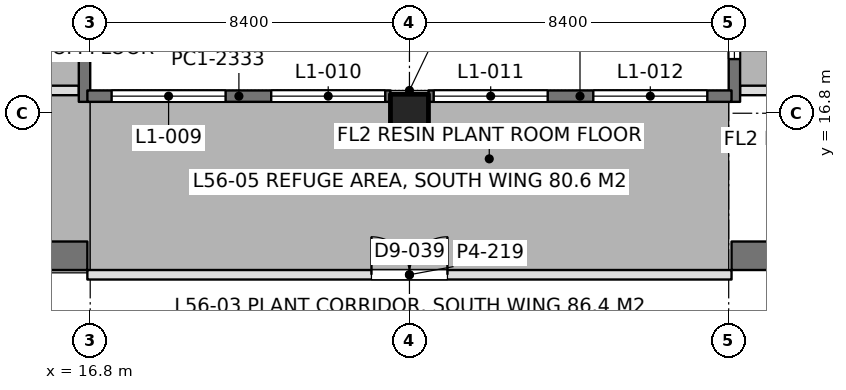
"""IFC4 building model, lengths in metres.
Left out: names, types, materials, properties, quantities, classifications, styles, units other than length and angle.
Written with IfcOpenShell. Run it as: python <this file> out.ifc"""

import sys

from ifc_helpers import new_model, si_unit, direction, frame, frame_2d, origin, origin_2d, place, context, subcontext, project, spatial, rectangle, extrude, element, fill, save


model = new_model("IFC4")
c1 = context("Model", 3, precision=1e-05, world=origin(), true_north=direction((0.0, 1.0)))
c2 = subcontext(c1, "Body", "Model", "MODEL_VIEW")
j1 = project(units=[si_unit("LENGTHUNIT", "METRE"), si_unit("PLANEANGLEUNIT", "RADIAN")], contexts=[c1])
p1 = place(None, origin())
s1 = spatial("IfcSite", under=j1, at=p1, CompositionType="ELEMENT")
p2 = place(p1, origin())
s2 = spatial("IfcBuilding", under=s1, at=p2, CompositionType="ELEMENT")
p3 = place(p2, frame((0.0, 0.0, 244.8)))
s3 = spatial("IfcBuildingStorey", under=s2, at=p3, CompositionType="ELEMENT", Elevation=244.8)
p4 = place(p3, frame((25.2, 16.8, 0.0), z_axis=(0.0, 0.0, 1.0), x_axis=(1.0, 0.0, 0.0)))
e1 = element("IfcColumn", 1, at=p4, inside=s3, PredefinedType="COLUMN", context=c2, shape_type="SweptSolid", body=[
    extrude(rectangle(XDim=1.0, YDim=1.0, at=origin_2d()), origin(), (0.0, 0.0, 1.0), 5.4),
])
p5 = place(p3, frame((-1.125, 13.05, 0.0), z_axis=(0.0, 0.0, 1.0), x_axis=(1.0, 0.0, 0.0)))
e2 = element("IfcWall", 2, at=p5, inside=s3, PredefinedType="SHEAR", context=c2, shape_type="SweptSolid", body=[
    extrude(rectangle(XDim=17.85, YDim=0.75, at=frame_2d((8.925, 0.0))), origin(), (0.0, 0.0, 1.0), 5.4),
])
p6 = place(p5, frame((8.875, 0.0, 0.0)))
e3 = element("IfcOpeningElement", 3, at=p6, cuts=e2, PredefinedType="OPENING", context=c2, shape_type="SweptSolid", body=[
    extrude(rectangle(XDim=1.8, YDim=2.4, at=frame_2d((0.9, 1.2))), frame((0.0, 0.385, 0.0), z_axis=(0.0, -1.0, 0.0), x_axis=(1.0, 0.0, 0.0)), (0.0, 0.0, 1.0), 0.77),
])
p7 = place(p3, frame((33.675, 13.05, 0.0), z_axis=(0.0, 0.0, 1.0), x_axis=(1.0, 0.0, 0.0)))
e4 = element("IfcWall", 4, at=p7, inside=s3, PredefinedType="SHEAR", context=c2, shape_type="SweptSolid", body=[
    extrude(rectangle(XDim=17.85, YDim=0.75, at=frame_2d((8.925, 0.0))), origin(), (0.0, 0.0, 1.0), 5.4),
])
p8 = place(p7, frame((7.175, 0.0, 0.0)))
e5 = element("IfcOpeningElement", 5, at=p8, cuts=e4, PredefinedType="OPENING", context=c2, shape_type="SweptSolid", body=[
    extrude(rectangle(XDim=1.8, YDim=2.4, at=frame_2d((0.9, 1.2))), frame((0.0, 0.385, 0.0), z_axis=(0.0, -1.0, 0.0), x_axis=(1.0, 0.0, 0.0)), (0.0, 0.0, 1.0), 0.77),
])
p9 = place(p3, frame((16.65, 17.1, 0.0), z_axis=(0.0, 0.0, 1.0), x_axis=(0.0, 1.0, 0.0)))
e6 = element("IfcWall", 6, at=p9, inside=s3, PredefinedType="SOLIDWALL", context=c2, shape_type="SweptSolid", body=[
    extrude(rectangle(XDim=10.7, YDim=0.3, at=frame_2d((5.35, 0.0))), origin(), (0.0, 0.0, 1.0), 5.25),
])
p10 = place(p9, frame((1.125, 0.0, 1.2)))
e7 = element("IfcOpeningElement", 7, at=p10, cuts=e6, PredefinedType="OPENING", context=c2, shape_type="SweptSolid", body=[
    extrude(rectangle(XDim=3.0, YDim=2.4, at=frame_2d((1.5, 1.2))), frame((0.0, 0.16, 0.0), z_axis=(0.0, -1.0, 0.0), x_axis=(1.0, 0.0, 0.0)), (0.0, 0.0, 1.0), 0.32),
])
p11 = place(p9, frame((7.175, 0.0, 1.2)))
e8 = element("IfcOpeningElement", 8, at=p11, cuts=e6, PredefinedType="OPENING", context=c2, shape_type="SweptSolid", body=[
    extrude(rectangle(XDim=3.0, YDim=2.4, at=frame_2d((1.5, 1.2))), frame((0.0, 0.16, 0.0), z_axis=(0.0, -1.0, 0.0), x_axis=(1.0, 0.0, 0.0)), (0.0, 0.0, 1.0), 0.32),
])
p12 = place(p3, frame((33.75, 17.1, 0.0), z_axis=(0.0, 0.0, 1.0), x_axis=(0.0, 1.0, 0.0)))
e9 = element("IfcWall", 9, at=p12, inside=s3, PredefinedType="SOLIDWALL", context=c2, shape_type="SweptSolid", body=[
    extrude(rectangle(XDim=10.7, YDim=0.3, at=frame_2d((5.35, 0.0))), origin(), (0.0, 0.0, 1.0), 5.25),
])
p13 = place(p12, frame((1.125, 0.0, 1.2)))
e10 = element("IfcOpeningElement", 10, at=p13, cuts=e9, PredefinedType="OPENING", context=c2, shape_type="SweptSolid", body=[
    extrude(rectangle(XDim=3.0, YDim=2.4, at=frame_2d((1.5, 1.2))), frame((0.0, 0.16, 0.0), z_axis=(0.0, -1.0, 0.0), x_axis=(1.0, 0.0, 0.0)), (0.0, 0.0, 1.0), 0.32),
])
p14 = place(p12, frame((7.175, 0.0, 1.2)))
e11 = element("IfcOpeningElement", 11, at=p14, cuts=e9, PredefinedType="OPENING", context=c2, shape_type="SweptSolid", body=[
    extrude(rectangle(XDim=3.0, YDim=2.4, at=frame_2d((1.5, 1.2))), frame((0.0, 0.16, 0.0), z_axis=(0.0, -1.0, 0.0), x_axis=(1.0, 0.0, 0.0)), (0.0, 0.0, 1.0), 0.32),
])
p15 = place(p3, frame((16.725, 17.25, 0.0), z_axis=(0.0, 0.0, 1.0), x_axis=(1.0, 0.0, 0.0)))
e12 = element("IfcWall", 12, at=p15, inside=s3, PredefinedType="SOLIDWALL", context=c2, shape_type="SweptSolid", body=[
    extrude(rectangle(XDim=7.975, YDim=0.3, at=frame_2d((3.987, 0.0))), origin(), (0.0, 0.0, 1.0), 5.25),
])
p16 = place(p15, frame((0.637, 0.0, 1.2)))
e13 = element("IfcOpeningElement", 13, at=p16, cuts=e12, PredefinedType="OPENING", context=c2, shape_type="SweptSolid", body=[
    extrude(rectangle(XDim=3.0, YDim=2.4, at=frame_2d((1.5, 1.2))), frame((0.0, 0.16, 0.0), z_axis=(0.0, -1.0, 0.0), x_axis=(1.0, 0.0, 0.0)), (0.0, 0.0, 1.0), 0.32),
])
p17 = place(p15, frame((4.837, 0.0, 1.2)))
e14 = element("IfcOpeningElement", 14, at=p17, cuts=e12, PredefinedType="OPENING", context=c2, shape_type="SweptSolid", body=[
    extrude(rectangle(XDim=3.0, YDim=2.4, at=frame_2d((1.5, 1.2))), frame((0.0, 0.16, 0.0), z_axis=(0.0, -1.0, 0.0), x_axis=(1.0, 0.0, 0.0)), (0.0, 0.0, 1.0), 0.32),
])
p18 = place(p3, frame((25.7, 17.25, 0.0), z_axis=(0.0, 0.0, 1.0), x_axis=(1.0, 0.0, 0.0)))
e15 = element("IfcWall", 15, at=p18, inside=s3, PredefinedType="SOLIDWALL", context=c2, shape_type="SweptSolid", body=[
    extrude(rectangle(XDim=7.975, YDim=0.3, at=frame_2d((3.988, 0.0))), origin(), (0.0, 0.0, 1.0), 5.25),
])
p19 = place(p18, frame((0.137, 0.0, 1.2)))
e16 = element("IfcOpeningElement", 16, at=p19, cuts=e15, PredefinedType="OPENING", context=c2, shape_type="SweptSolid", body=[
    extrude(rectangle(XDim=3.0, YDim=2.4, at=frame_2d((1.5, 1.2))), frame((0.0, 0.16, 0.0), z_axis=(0.0, -1.0, 0.0), x_axis=(1.0, 0.0, 0.0)), (0.0, 0.0, 1.0), 0.32),
])
p20 = place(p18, frame((4.337, 0.0, 1.2)))
e17 = element("IfcOpeningElement", 17, at=p20, cuts=e15, PredefinedType="OPENING", context=c2, shape_type="SweptSolid", body=[
    extrude(rectangle(XDim=3.0, YDim=2.4, at=frame_2d((1.5, 1.2))), frame((0.0, 0.16, 0.0), z_axis=(0.0, -1.0, 0.0), x_axis=(1.0, 0.0, 0.0)), (0.0, 0.0, 1.0), 0.32),
])
for number, where, z_axis, x_axis in (
    (18, (10.598, 17.4, 0.0), (0.0, 0.0, 1.0), (1.0, 0.0, 0.0)),
    (19, (33.898, 17.4, 0.0), (0.0, 0.0, 1.0), (1.0, 0.0, 0.0)),
):
    element("IfcWall", number, at=place(p3, frame(where, z_axis=z_axis, x_axis=x_axis)), inside=s3, PredefinedType="PARTITIONING", context=c2, shape_type="SweptSolid", body=[
        extrude(rectangle(XDim=5.904, YDim=0.25, at=frame_2d((2.952, 0.0))), origin(), (0.0, 0.0, 1.0), 4.7),
    ])
p21 = place(p3, frame((16.725, 12.55, 0.0), z_axis=(0.0, 0.0, 1.0), x_axis=(1.0, 0.0, 0.0)))
e20 = element("IfcWall", 20, at=p21, inside=s3, PredefinedType="PARTITIONING", context=c2, shape_type="SweptSolid", body=[
    extrude(rectangle(XDim=16.95, YDim=0.25, at=frame_2d((8.475, 0.0))), origin(), (0.0, 0.0, 1.0), 4.7),
])
p22 = place(p21, frame((7.475, 0.0, 0.0)))
e21 = element("IfcOpeningElement", 21, at=p22, cuts=e20, PredefinedType="OPENING", context=c2, shape_type="SweptSolid", body=[
    extrude(rectangle(XDim=2.0, YDim=2.4, at=frame_2d((1.0, 1.2))), frame((0.0, 0.135, 0.0), z_axis=(0.0, -1.0, 0.0), x_axis=(1.0, 0.0, 0.0)), (0.0, 0.0, 1.0), 0.27),
])
p23 = place(p10, origin())
e22 = element("IfcWindow", 22, at=p23, inside=s3, PartitioningType="SINGLE_PANEL", PredefinedType="USERDEFINED", context=c2, shape_type="SweptSolid", body=[
    extrude(rectangle(XDim=3.0, YDim=2.4, at=frame_2d((1.5, 1.2))), frame((0.0, 0.03, 0.0), z_axis=(0.0, -1.0, 0.0), x_axis=(1.0, 0.0, 0.0)), (0.0, 0.0, 1.0), 0.06),
])
fill(e7, e22)
p24 = place(p13, origin())
e23 = element("IfcWindow", 23, at=p24, inside=s3, PartitioningType="SINGLE_PANEL", PredefinedType="USERDEFINED", context=c2, shape_type="SweptSolid", body=[
    extrude(rectangle(XDim=3.0, YDim=2.4, at=frame_2d((1.5, 1.2))), frame((0.0, 0.03, 0.0), z_axis=(0.0, -1.0, 0.0), x_axis=(1.0, 0.0, 0.0)), (0.0, 0.0, 1.0), 0.06),
])
fill(e10, e23)
p25 = place(p16, origin())
e24 = element("IfcWindow", 24, at=p25, inside=s3, PartitioningType="SINGLE_PANEL", PredefinedType="USERDEFINED", context=c2, shape_type="SweptSolid", body=[
    extrude(rectangle(XDim=3.0, YDim=2.4, at=frame_2d((1.5, 1.2))), frame((0.0, 0.03, 0.0), z_axis=(0.0, -1.0, 0.0), x_axis=(1.0, 0.0, 0.0)), (0.0, 0.0, 1.0), 0.06),
])
fill(e13, e24)
p26 = place(p17, origin())
e25 = element("IfcWindow", 25, at=p26, inside=s3, PartitioningType="SINGLE_PANEL", PredefinedType="USERDEFINED", context=c2, shape_type="SweptSolid", body=[
    extrude(rectangle(XDim=3.0, YDim=2.4, at=frame_2d((1.5, 1.2))), frame((0.0, 0.03, 0.0), z_axis=(0.0, -1.0, 0.0), x_axis=(1.0, 0.0, 0.0)), (0.0, 0.0, 1.0), 0.06),
])
fill(e14, e25)
p27 = place(p19, origin())
e26 = element("IfcWindow", 26, at=p27, inside=s3, PartitioningType="SINGLE_PANEL", PredefinedType="USERDEFINED", context=c2, shape_type="SweptSolid", body=[
    extrude(rectangle(XDim=3.0, YDim=2.4, at=frame_2d((1.5, 1.2))), frame((0.0, 0.03, 0.0), z_axis=(0.0, -1.0, 0.0), x_axis=(1.0, 0.0, 0.0)), (0.0, 0.0, 1.0), 0.06),
])
fill(e16, e26)
p28 = place(p20, origin())
e27 = element("IfcWindow", 27, at=p28, inside=s3, PartitioningType="SINGLE_PANEL", PredefinedType="USERDEFINED", context=c2, shape_type="SweptSolid", body=[
    extrude(rectangle(XDim=3.0, YDim=2.4, at=frame_2d((1.5, 1.2))), frame((0.0, 0.03, 0.0), z_axis=(0.0, -1.0, 0.0), x_axis=(1.0, 0.0, 0.0)), (0.0, 0.0, 1.0), 0.06),
])
fill(e17, e27)
p29 = place(p22, origin())
e28 = element("IfcDoor", 28, at=p29, inside=s3, OperationType="DOUBLE_DOOR_SINGLE_SWING", PredefinedType="DOOR", context=c2, shape_type="SweptSolid", body=[
    extrude(rectangle(XDim=2.0, YDim=2.4, at=frame_2d((1.0, 1.2))), frame((0.0, 0.025, 0.0), z_axis=(0.0, -1.0, 0.0), x_axis=(1.0, 0.0, 0.0)), (0.0, 0.0, 1.0), 0.05),
])
fill(e21, e28)
save(model, sys.argv[1])
